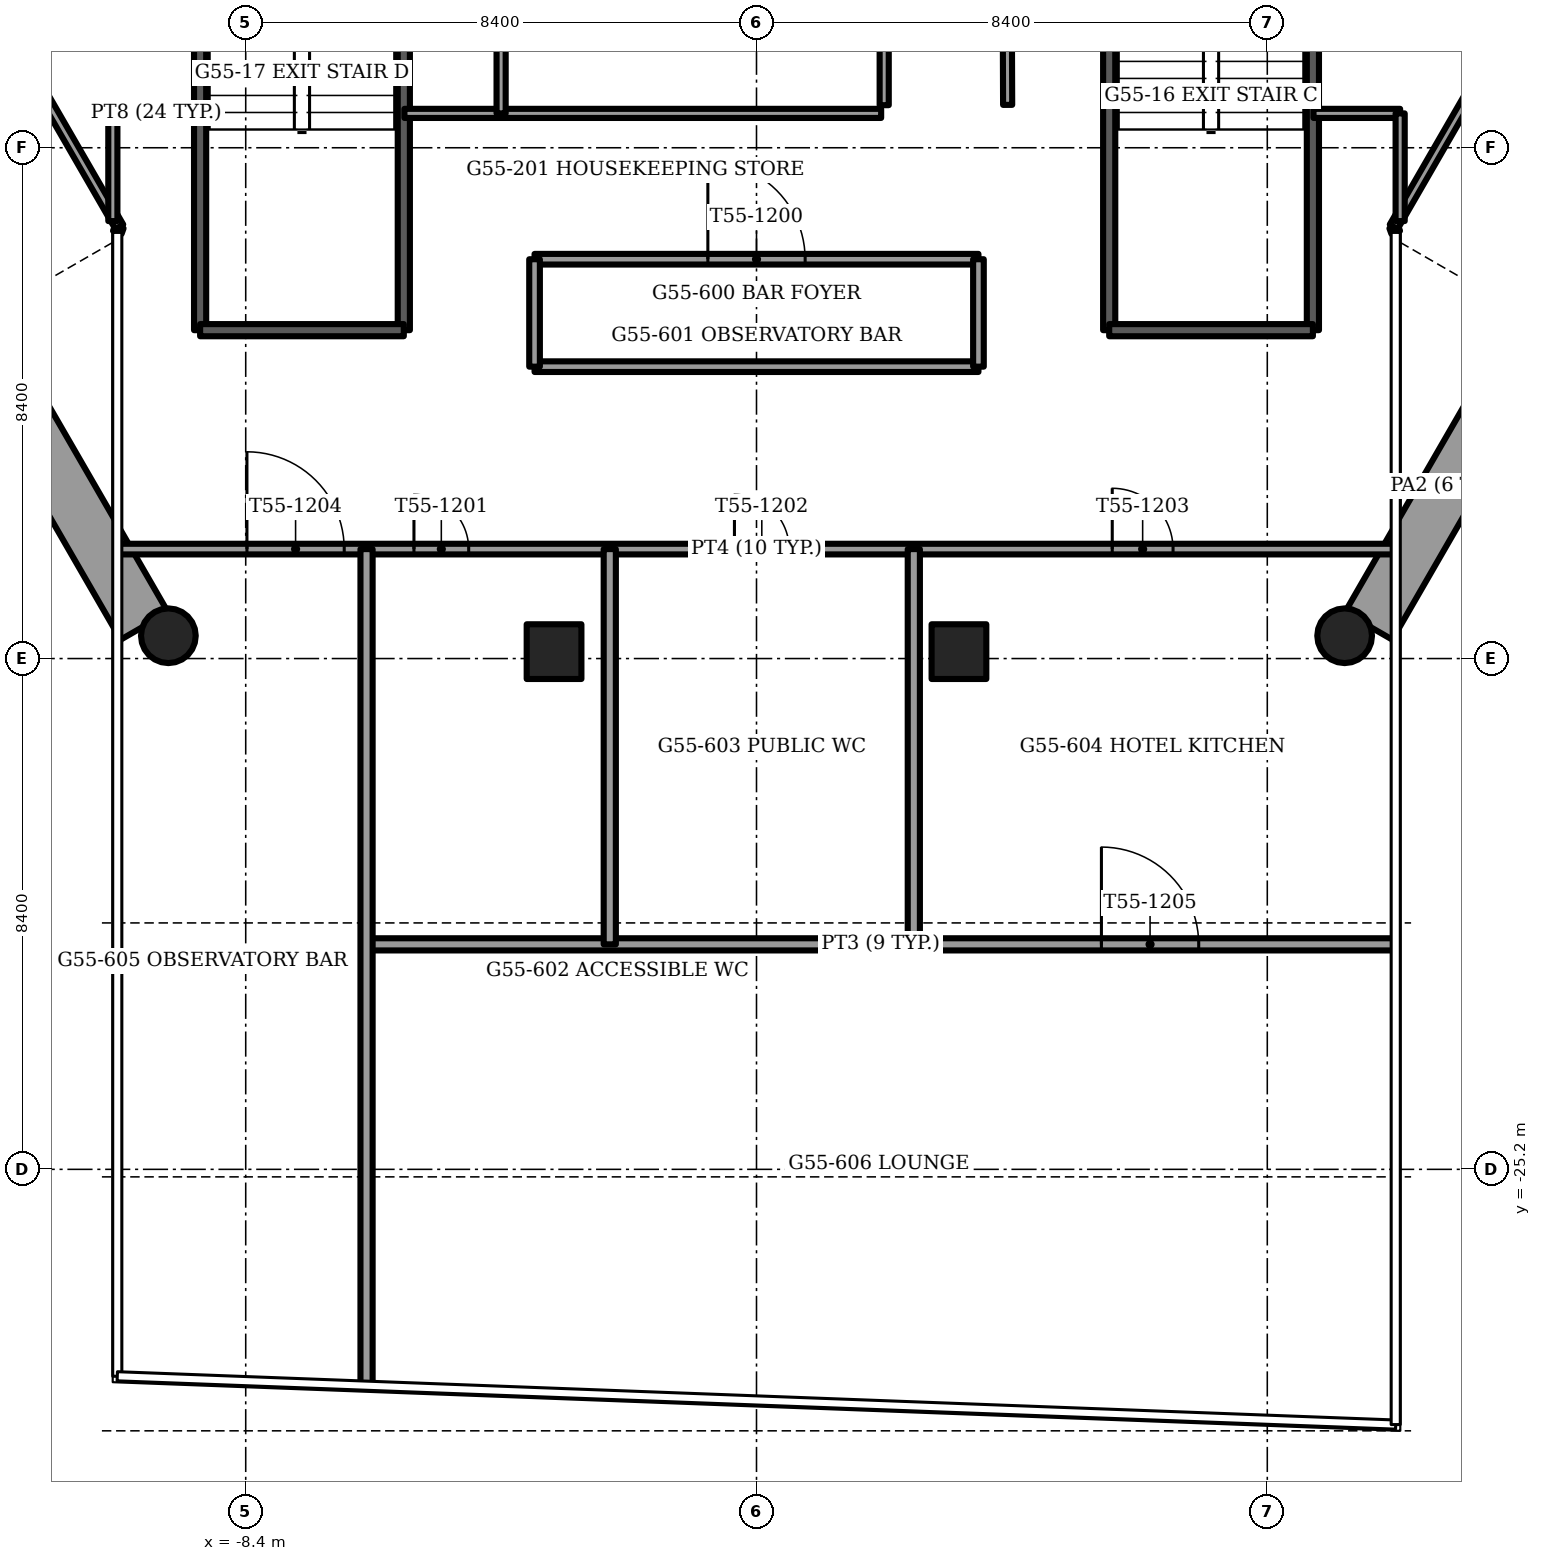
"""IFC4 building model, lengths in metres.
Left out: names, types, materials, properties, quantities, classifications, styles, units other than length and angle.
Written with IfcOpenShell. Run it as: python <this file> out.ifc"""

import sys

from ifc_helpers import new_model, si_unit, direction, frame, frame_2d, origin, origin_2d, place, context, subcontext, project, spatial, rectangle, circle, extrude, element, fill, save


model = new_model("IFC4")
c1 = context("Model", 3, precision=1e-05, world=origin(), true_north=direction((0.0, 1.0)))
c2 = subcontext(c1, "Body", "Model", "MODEL_VIEW")
j1 = project(units=[si_unit("LENGTHUNIT", "METRE"), si_unit("PLANEANGLEUNIT", "RADIAN")], contexts=[c1])
p1 = place(None, origin())
s1 = spatial("IfcSite", under=j1, at=p1, CompositionType="ELEMENT")
p2 = place(p1, origin())
s2 = spatial("IfcBuilding", under=s1, at=p2, CompositionType="ELEMENT")
p3 = place(p2, frame((0.0, 0.0, 222.0)))
s3 = spatial("IfcBuildingStorey", under=s2, at=p3, CompositionType="ELEMENT", Elevation=222.0)
for number, where, z_axis, x_axis in (
    (1, (-9.672, -16.425, -1.2), (0.0, 0.0, 1.0), (1.0, 0.0, 0.0)),
    (2, (9.672, -16.425, -1.2), (0.0, 0.0, 1.0), (1.0, 0.0, 0.0)),
):
    element("IfcColumn", number, at=place(p3, frame(where, z_axis=z_axis, x_axis=x_axis)), inside=s3, PredefinedType="COLUMN", context=c2, shape_type="SweptSolid", body=[
        extrude(circle(Radius=0.45, at=origin_2d()), origin(), (0.0, 0.0, 1.0), 3.75),
    ])
for number, where, z_axis, x_axis in (
    (3, (-3.329, -16.686, -1.2), (0.0, 0.0, 1.0), (-1.0, 0.0, 0.0)),
    (4, (3.329, -16.686, -1.2), (0.0, 0.0, 1.0), (-1.0, 0.0, 0.0)),
):
    element("IfcColumn", number, at=place(p3, frame(where, z_axis=z_axis, x_axis=x_axis)), inside=s3, PredefinedType="COLUMN", context=c2, shape_type="SweptSolid", body=[
        extrude(rectangle(XDim=0.9, YDim=0.9, at=origin_2d()), origin(), (0.0, 0.0, 1.0), 3.75),
    ])
for number, where, z_axis, x_axis in (
    (5, (-12.718, -11.672, 0.0), (0.0, 0.0, 1.0), (0.5, -0.866, 0.0)),
    (6, (10.066, -16.264, 0.0), (0.0, 0.0, 1.0), (0.5, 0.866, 0.0)),
):
    element("IfcWall", number, at=place(p3, frame(where, z_axis=z_axis, x_axis=x_axis)), inside=s3, PredefinedType="PARAPET", context=c2, shape_type="SweptSolid", body=[
        extrude(rectangle(XDim=5.303, YDim=0.9, at=frame_2d((2.651, 0.0))), origin(), (0.0, 0.0, 1.0), 1.1),
    ])
p4 = place(p3, frame((-15.677, -0.696, 0.0), z_axis=(0.0, 0.0, 1.0), x_axis=(0.49999822861, -0.866026426494, 0.0)))
e7 = element("IfcWall", 7, at=p4, inside=s3, PredefinedType="SOLIDWALL", context=c2, shape_type="SweptSolid", body=[
    extrude(rectangle(XDim=10.396, YDim=0.15, at=frame_2d((5.198, 0.0))), origin(), (0.0, 0.0, 1.0), 3.45),
])
p5 = place(p4, frame((4.183, 0.0, 0.15)))
e8 = element("IfcOpeningElement", 8, at=p5, cuts=e7, PredefinedType="OPENING", context=c2, shape_type="SweptSolid", body=[
    extrude(rectangle(XDim=0.9, YDim=2.2, at=frame_2d((0.45, 1.1))), frame((0.0, 0.075, 0.0), z_axis=(0.0, -1.0, 0.0), x_axis=(1.0, 0.0, 0.0)), (0.0, 0.0, 1.0), 0.15),
])
p6 = place(p4, frame((5.536, 0.0, 0.15)))
e9 = element("IfcOpeningElement", 9, at=p6, cuts=e7, PredefinedType="OPENING", context=c2, shape_type="SweptSolid", body=[
    extrude(rectangle(XDim=1.4, YDim=2.2, at=frame_2d((0.7, 1.1))), frame((0.0, 0.075, 0.0), z_axis=(0.0, -1.0, 0.0), x_axis=(1.0, 0.0, 0.0)), (0.0, 0.0, 1.0), 0.15),
])
p7 = place(p3, frame((10.479, -9.7, 0.0), z_axis=(0.0, 0.0, 1.0), x_axis=(0.49999822861, 0.866026426494, 0.0)))
e10 = element("IfcWall", 10, at=p7, inside=s3, PredefinedType="SOLIDWALL", context=c2, shape_type="SweptSolid", body=[
    extrude(rectangle(XDim=10.396, YDim=0.15, at=frame_2d((5.198, 0.0))), origin(), (0.0, 0.0, 1.0), 3.45),
])
p8 = place(p7, frame((3.461, 0.0, 0.15)))
e11 = element("IfcOpeningElement", 11, at=p8, cuts=e10, PredefinedType="OPENING", context=c2, shape_type="SweptSolid", body=[
    extrude(rectangle(XDim=0.9, YDim=2.2, at=frame_2d((0.45, 1.1))), frame((0.0, 0.075, 0.0), z_axis=(0.0, -1.0, 0.0), x_axis=(1.0, 0.0, 0.0)), (0.0, 0.0, 1.0), 0.15),
])
p9 = place(p7, frame((4.814, 0.0, 0.15)))
e12 = element("IfcOpeningElement", 12, at=p9, cuts=e10, PredefinedType="OPENING", context=c2, shape_type="SweptSolid", body=[
    extrude(rectangle(XDim=1.4, YDim=2.2, at=frame_2d((0.7, 1.1))), frame((0.0, 0.075, 0.0), z_axis=(0.0, -1.0, 0.0), x_axis=(1.0, 0.0, 0.0)), (0.0, 0.0, 1.0), 0.15),
])
for number, where, z_axis, x_axis in (
    (13, (-10.479, -9.7, 0.0), (0.0, 0.0, 1.0), (-0.339, -0.941, 0.0)),
    (14, (10.479, -9.7, 0.0), (0.0, 0.0, 1.0), (0.339, -0.941, 0.0)),
):
    element("IfcWall", number, at=place(p3, frame(where, z_axis=z_axis, x_axis=x_axis)), inside=s3, PredefinedType="SOLIDWALL", context=c2, shape_type="SweptSolid", body=[
        extrude(rectangle(XDim=0.098, YDim=0.15, at=frame_2d((0.049, 0.0))), origin(), (0.0, 0.0, 1.0), 3.45),
    ])
for number, where, z_axis, x_axis in (
    (15, (5.8, -3.7, -0.3), (0.0, 0.0, 1.0), (0.0, -1.0, 0.0)),
    (16, (9.15, -3.7, -0.3), (0.0, 0.0, 1.0), (0.0, -1.0, 0.0)),
):
    element("IfcWall", number, at=place(p3, frame(where, z_axis=z_axis, x_axis=x_axis)), inside=s3, PredefinedType="SOLIDWALL", context=c2, shape_type="SweptSolid", body=[
        extrude(rectangle(XDim=7.7, YDim=0.2, at=frame_2d((3.85, 0.0))), origin(), (0.0, 0.0, 1.0), 3.75),
    ])
p10 = place(p3, frame((5.8, -11.4, -0.3), z_axis=(0.0, 0.0, 1.0), x_axis=(1.0, 0.0, 0.0)))
e17 = element("IfcWall", 17, at=p10, inside=s3, PredefinedType="SOLIDWALL", context=c2, shape_type="SweptSolid", body=[
    extrude(rectangle(XDim=3.35, YDim=0.2, at=frame_2d((1.675, 0.0))), origin(), (0.0, 0.0, 1.0), 3.75),
])
for number, where, z_axis, x_axis in (
    (18, (-9.15, -3.7, -0.3), (0.0, 0.0, 1.0), (0.0, -1.0, 0.0)),
    (19, (-5.8, -3.7, -0.3), (0.0, 0.0, 1.0), (0.0, -1.0, 0.0)),
):
    element("IfcWall", number, at=place(p3, frame(where, z_axis=z_axis, x_axis=x_axis)), inside=s3, PredefinedType="SOLIDWALL", context=c2, shape_type="SweptSolid", body=[
        extrude(rectangle(XDim=7.7, YDim=0.2, at=frame_2d((3.85, 0.0))), origin(), (0.0, 0.0, 1.0), 3.75),
    ])
p11 = place(p3, frame((-9.15, -11.4, -0.3), z_axis=(0.0, 0.0, 1.0), x_axis=(1.0, 0.0, 0.0)))
e20 = element("IfcWall", 20, at=p11, inside=s3, PredefinedType="SOLIDWALL", context=c2, shape_type="SweptSolid", body=[
    extrude(rectangle(XDim=3.35, YDim=0.2, at=frame_2d((1.675, 0.0))), origin(), (0.0, 0.0, 1.0), 3.75),
])
p12 = place(p3, frame((-10.585, -7.835, 0.0), z_axis=(0.0, 0.0, 1.0), x_axis=(1.0, 0.0, 0.0)))
e21 = element("IfcWall", 21, at=p12, inside=s3, PredefinedType="PARTITIONING", context=c2, shape_type="SweptSolid", body=[
    extrude(rectangle(XDim=1.425, YDim=0.15, at=frame_2d((0.712, 0.0))), origin(), (0.0, 0.0, 1.0), 3.45),
])
p13 = place(p3, frame((-5.79, -7.835, 0.0), z_axis=(0.0, 0.0, 1.0), x_axis=(1.0, 0.0, 0.0)))
e22 = element("IfcWall", 22, at=p13, inside=s3, PredefinedType="PARTITIONING", context=c2, shape_type="SweptSolid", body=[
    extrude(rectangle(XDim=7.84, YDim=0.15, at=frame_2d((3.92, 0.0))), origin(), (0.0, 0.0, 1.0), 3.45),
])
p14 = place(p3, frame((9.16, -7.835, 0.0), z_axis=(0.0, 0.0, 1.0), x_axis=(1.0, 0.0, 0.0)))
e23 = element("IfcWall", 23, at=p14, inside=s3, PredefinedType="PARTITIONING", context=c2, shape_type="SweptSolid", body=[
    extrude(rectangle(XDim=1.425, YDim=0.15, at=frame_2d((0.712, 0.0))), origin(), (0.0, 0.0, 1.0), 3.45),
])
p15 = place(p3, frame((10.585, -9.606, 0.0), z_axis=(0.0, 0.0, 1.0), x_axis=(0.0, 1.0, 0.0)))
e24 = element("IfcWall", 24, at=p15, inside=s3, PredefinedType="PARTITIONING", context=c2, shape_type="SweptSolid", body=[
    extrude(rectangle(XDim=1.771, YDim=0.15, at=frame_2d((0.885, 0.0))), origin(), (0.0, 0.0, 1.0), 3.45),
])
p16 = place(p3, frame((2.1, -7.7, 0.0), z_axis=(0.0, 0.0, 1.0), x_axis=(0.0, 1.0, 0.0)))
e25 = element("IfcWall", 25, at=p16, inside=s3, PredefinedType="PARTITIONING", context=c2, shape_type="SweptSolid", body=[
    extrude(rectangle(XDim=4.0, YDim=0.15, at=frame_2d((2.0, 0.0))), origin(), (0.0, 0.0, 1.0), 3.45),
])
p17 = place(p3, frame((-4.2, -7.835, 0.0), z_axis=(0.0, 0.0, 1.0), x_axis=(0.0, 1.0, 0.0)))
e26 = element("IfcWall", 26, at=p17, inside=s3, PredefinedType="PARTITIONING", context=c2, shape_type="SweptSolid", body=[
    extrude(rectangle(XDim=4.135, YDim=0.15, at=frame_2d((2.067, 0.0))), origin(), (0.0, 0.0, 1.0), 3.45),
])
p18 = place(p3, frame((-10.585, -9.606, 0.0), z_axis=(0.0, 0.0, 1.0), x_axis=(0.0, 1.0, 0.0)))
e27 = element("IfcWall", 27, at=p18, inside=s3, PredefinedType="PARTITIONING", context=c2, shape_type="SweptSolid", body=[
    extrude(rectangle(XDim=1.771, YDim=0.15, at=frame_2d((0.885, 0.0))), origin(), (0.0, 0.0, 1.0), 3.45),
])
p19 = place(p3, frame((4.13, -7.695, 0.0), z_axis=(0.0, 0.0, 1.0), x_axis=(-0.003727669041, 0.999993052218, 0.0)))
e28 = element("IfcWall", 28, at=p19, inside=s3, PredefinedType="PARTITIONING", context=c2, shape_type="SweptSolid", body=[
    extrude(rectangle(XDim=3.995, YDim=0.15, at=frame_2d((1.998, 0.0))), origin(), (0.0, 0.0, 1.0), 3.45),
])
p20 = place(p3, frame((-10.493, -15.0, 0.0), z_axis=(0.0, 0.0, 1.0), x_axis=(1.0, 0.0, 0.0)))
e29 = element("IfcWall", 29, at=p20, inside=s3, PredefinedType="PARTITIONING", context=c2, shape_type="SweptSolid", body=[
    extrude(rectangle(XDim=20.986, YDim=0.175, at=frame_2d((10.493, 0.0))), origin(), (0.0, 0.0, 1.0), 3.45),
])
p21 = place(p20, frame((4.86, 0.0, 0.0)))
e30 = element("IfcOpeningElement", 30, at=p21, cuts=e29, PredefinedType="OPENING", context=c2, shape_type="SweptSolid", body=[
    extrude(rectangle(XDim=0.9, YDim=2.1, at=frame_2d((0.45, 1.05))), frame((0.0, 0.087, 0.0), z_axis=(0.0, -1.0, 0.0), x_axis=(1.0, 0.0, 0.0)), (0.0, 0.0, 1.0), 0.175),
])
p22 = place(p20, frame((10.13, 0.0, 0.0)))
e31 = element("IfcOpeningElement", 31, at=p22, cuts=e29, PredefinedType="OPENING", context=c2, shape_type="SweptSolid", body=[
    extrude(rectangle(XDim=0.9, YDim=2.1, at=frame_2d((0.45, 1.05))), frame((0.0, 0.087, 0.0), z_axis=(0.0, -1.0, 0.0), x_axis=(1.0, 0.0, 0.0)), (0.0, 0.0, 1.0), 0.175),
])
p23 = place(p20, frame((16.344, 0.0, 0.0)))
e32 = element("IfcOpeningElement", 32, at=p23, cuts=e29, PredefinedType="OPENING", context=c2, shape_type="SweptSolid", body=[
    extrude(rectangle(XDim=1.0, YDim=2.1, at=frame_2d((0.5, 1.05))), frame((0.0, 0.087, 0.0), z_axis=(0.0, -1.0, 0.0), x_axis=(1.0, 0.0, 0.0)), (0.0, 0.0, 1.0), 0.175),
])
p24 = place(p20, frame((2.113, 0.0, 0.0)))
e33 = element("IfcOpeningElement", 33, at=p24, cuts=e29, PredefinedType="OPENING", context=c2, shape_type="SweptSolid", body=[
    extrude(rectangle(XDim=1.6, YDim=2.1, at=frame_2d((0.8, 1.05))), frame((0.0, 0.087, 0.0), z_axis=(0.0, -1.0, 0.0), x_axis=(1.0, 0.0, 0.0)), (0.0, 0.0, 1.0), 0.175),
])
p25 = place(p3, frame((-3.65, -12.0, 0.0), z_axis=(0.0, 0.0, 1.0), x_axis=(1.0, 0.0, 0.0)))
e34 = element("IfcWall", 34, at=p25, inside=s3, PredefinedType="PARTITIONING", context=c2, shape_type="SweptSolid", body=[
    extrude(rectangle(XDim=7.3, YDim=0.175, at=frame_2d((3.65, 0.0))), origin(), (0.0, 0.0, 1.0), 3.45),
])
p26 = place(p3, frame((-3.65, -10.233, 0.0), z_axis=(0.0, 0.0, 1.0), x_axis=(1.0, 0.0, 0.0)))
e35 = element("IfcWall", 35, at=p26, inside=s3, PredefinedType="PARTITIONING", context=c2, shape_type="SweptSolid", body=[
    extrude(rectangle(XDim=7.3, YDim=0.175, at=frame_2d((3.65, 0.0))), origin(), (0.0, 0.0, 1.0), 3.45),
])
p27 = place(p26, frame((2.85, 0.0, 0.0)))
e36 = element("IfcOpeningElement", 36, at=p27, cuts=e35, PredefinedType="OPENING", context=c2, shape_type="SweptSolid", body=[
    extrude(rectangle(XDim=1.6, YDim=2.1, at=frame_2d((0.8, 1.05))), frame((0.0, 0.087, 0.0), z_axis=(0.0, -1.0, 0.0), x_axis=(1.0, 0.0, 0.0)), (0.0, 0.0, 1.0), 0.175),
])
for number, where, z_axis, x_axis in (
    (37, (-3.65, -12.0, 0.0), (0.0, 0.0, 1.0), (0.0, 1.0, 0.0)),
    (38, (3.65, -12.0, 0.0), (0.0, 0.0, 1.0), (0.0, 1.0, 0.0)),
):
    element("IfcWall", number, at=place(p3, frame(where, z_axis=z_axis, x_axis=x_axis)), inside=s3, PredefinedType="PARTITIONING", context=c2, shape_type="SweptSolid", body=[
        extrude(rectangle(XDim=1.767, YDim=0.175, at=frame_2d((0.883, 0.0))), origin(), (0.0, 0.0, 1.0), 3.45),
    ])
p28 = place(p3, frame((-6.413, -21.5, 0.0), z_axis=(0.0, 0.0, 1.0), x_axis=(1.0, 0.0, 0.0)))
e39 = element("IfcWall", 39, at=p28, inside=s3, PredefinedType="PARTITIONING", context=c2, shape_type="SweptSolid", body=[
    extrude(rectangle(XDim=16.906, YDim=0.2, at=frame_2d((8.453, 0.0))), origin(), (0.0, 0.0, 1.0), 3.45),
])
p29 = place(p28, frame((12.085, 0.0, 0.0)))
e40 = element("IfcOpeningElement", 40, at=p29, cuts=e39, PredefinedType="OPENING", context=c2, shape_type="SweptSolid", body=[
    extrude(rectangle(XDim=1.6, YDim=2.1, at=frame_2d((0.8, 1.05))), frame((0.0, 0.1, 0.0), z_axis=(0.0, -1.0, 0.0), x_axis=(1.0, 0.0, 0.0)), (0.0, 0.0, 1.0), 0.2),
])
p30 = place(p3, frame((-6.413, -28.739, 0.0), z_axis=(0.0, 0.0, 1.0), x_axis=(0.0, 1.0, 0.0)))
e41 = element("IfcWall", 41, at=p30, inside=s3, PredefinedType="PARTITIONING", context=c2, shape_type="SweptSolid", body=[
    extrude(rectangle(XDim=13.739, YDim=0.2, at=frame_2d((6.869, 0.0))), origin(), (0.0, 0.0, 1.0), 2.839),
])
for number, where, z_axis, x_axis in (
    (42, (-2.413, -21.5, 0.0), (0.0, 0.0, 1.0), (0.0, 1.0, 0.0)),
    (43, (2.587, -21.5, 0.0), (0.0, 0.0, 1.0), (0.0, 1.0, 0.0)),
):
    element("IfcWall", number, at=place(p3, frame(where, z_axis=z_axis, x_axis=x_axis)), inside=s3, PredefinedType="PARTITIONING", context=c2, shape_type="SweptSolid", body=[
        extrude(rectangle(XDim=6.5, YDim=0.2, at=frame_2d((3.25, 0.0))), origin(), (0.0, 0.0, 1.0), 2.839),
    ])
p31 = place(p27, origin())
e44 = element("IfcDoor", 44, at=p31, inside=s3, OperationType="DOUBLE_DOOR_SINGLE_SWING", PredefinedType="DOOR", context=c2, shape_type="SweptSolid", body=[
    extrude(rectangle(XDim=1.6, YDim=2.1, at=frame_2d((0.8, 1.05))), frame((0.0, 0.025, 0.0), z_axis=(0.0, -1.0, 0.0), x_axis=(1.0, 0.0, 0.0)), (0.0, 0.0, 1.0), 0.05),
])
fill(e36, e44)
p32 = place(p21, origin())
e45 = element("IfcDoor", 45, at=p32, inside=s3, OperationType="SINGLE_SWING_LEFT", PredefinedType="DOOR", context=c2, shape_type="SweptSolid", body=[
    extrude(rectangle(XDim=0.9, YDim=2.1, at=frame_2d((0.45, 1.05))), frame((0.0, 0.025, 0.0), z_axis=(0.0, -1.0, 0.0), x_axis=(1.0, 0.0, 0.0)), (0.0, 0.0, 1.0), 0.05),
])
fill(e30, e45)
p33 = place(p22, origin())
e46 = element("IfcDoor", 46, at=p33, inside=s3, OperationType="SINGLE_SWING_RIGHT", PredefinedType="DOOR", context=c2, shape_type="SweptSolid", body=[
    extrude(rectangle(XDim=0.9, YDim=2.1, at=frame_2d((0.45, 1.05))), frame((0.0, 0.025, 0.0), z_axis=(0.0, -1.0, 0.0), x_axis=(1.0, 0.0, 0.0)), (0.0, 0.0, 1.0), 0.05),
])
fill(e31, e46)
p34 = place(p23, origin())
e47 = element("IfcDoor", 47, at=p34, inside=s3, OperationType="SINGLE_SWING_LEFT", PredefinedType="DOOR", context=c2, shape_type="SweptSolid", body=[
    extrude(rectangle(XDim=1.0, YDim=2.1, at=frame_2d((0.5, 1.05))), frame((0.0, 0.025, 0.0), z_axis=(0.0, -1.0, 0.0), x_axis=(1.0, 0.0, 0.0)), (0.0, 0.0, 1.0), 0.05),
])
fill(e32, e47)
p35 = place(p24, origin())
e48 = element("IfcDoor", 48, at=p35, inside=s3, OperationType="DOUBLE_DOOR_SINGLE_SWING", PredefinedType="DOOR", context=c2, shape_type="SweptSolid", body=[
    extrude(rectangle(XDim=1.6, YDim=2.1, at=frame_2d((0.8, 1.05))), frame((0.0, 0.025, 0.0), z_axis=(0.0, -1.0, 0.0), x_axis=(1.0, 0.0, 0.0)), (0.0, 0.0, 1.0), 0.05),
])
fill(e33, e48)
p36 = place(p29, origin())
e49 = element("IfcDoor", 49, at=p36, inside=s3, OperationType="DOUBLE_DOOR_SINGLE_SWING", PredefinedType="DOOR", context=c2, shape_type="SweptSolid", body=[
    extrude(rectangle(XDim=1.6, YDim=2.1, at=frame_2d((0.8, 1.05))), frame((0.0, 0.025, 0.0), z_axis=(0.0, -1.0, 0.0), x_axis=(1.0, 0.0, 0.0)), (0.0, 0.0, 1.0), 0.05),
])
fill(e40, e49)
save(model, sys.argv[1])
